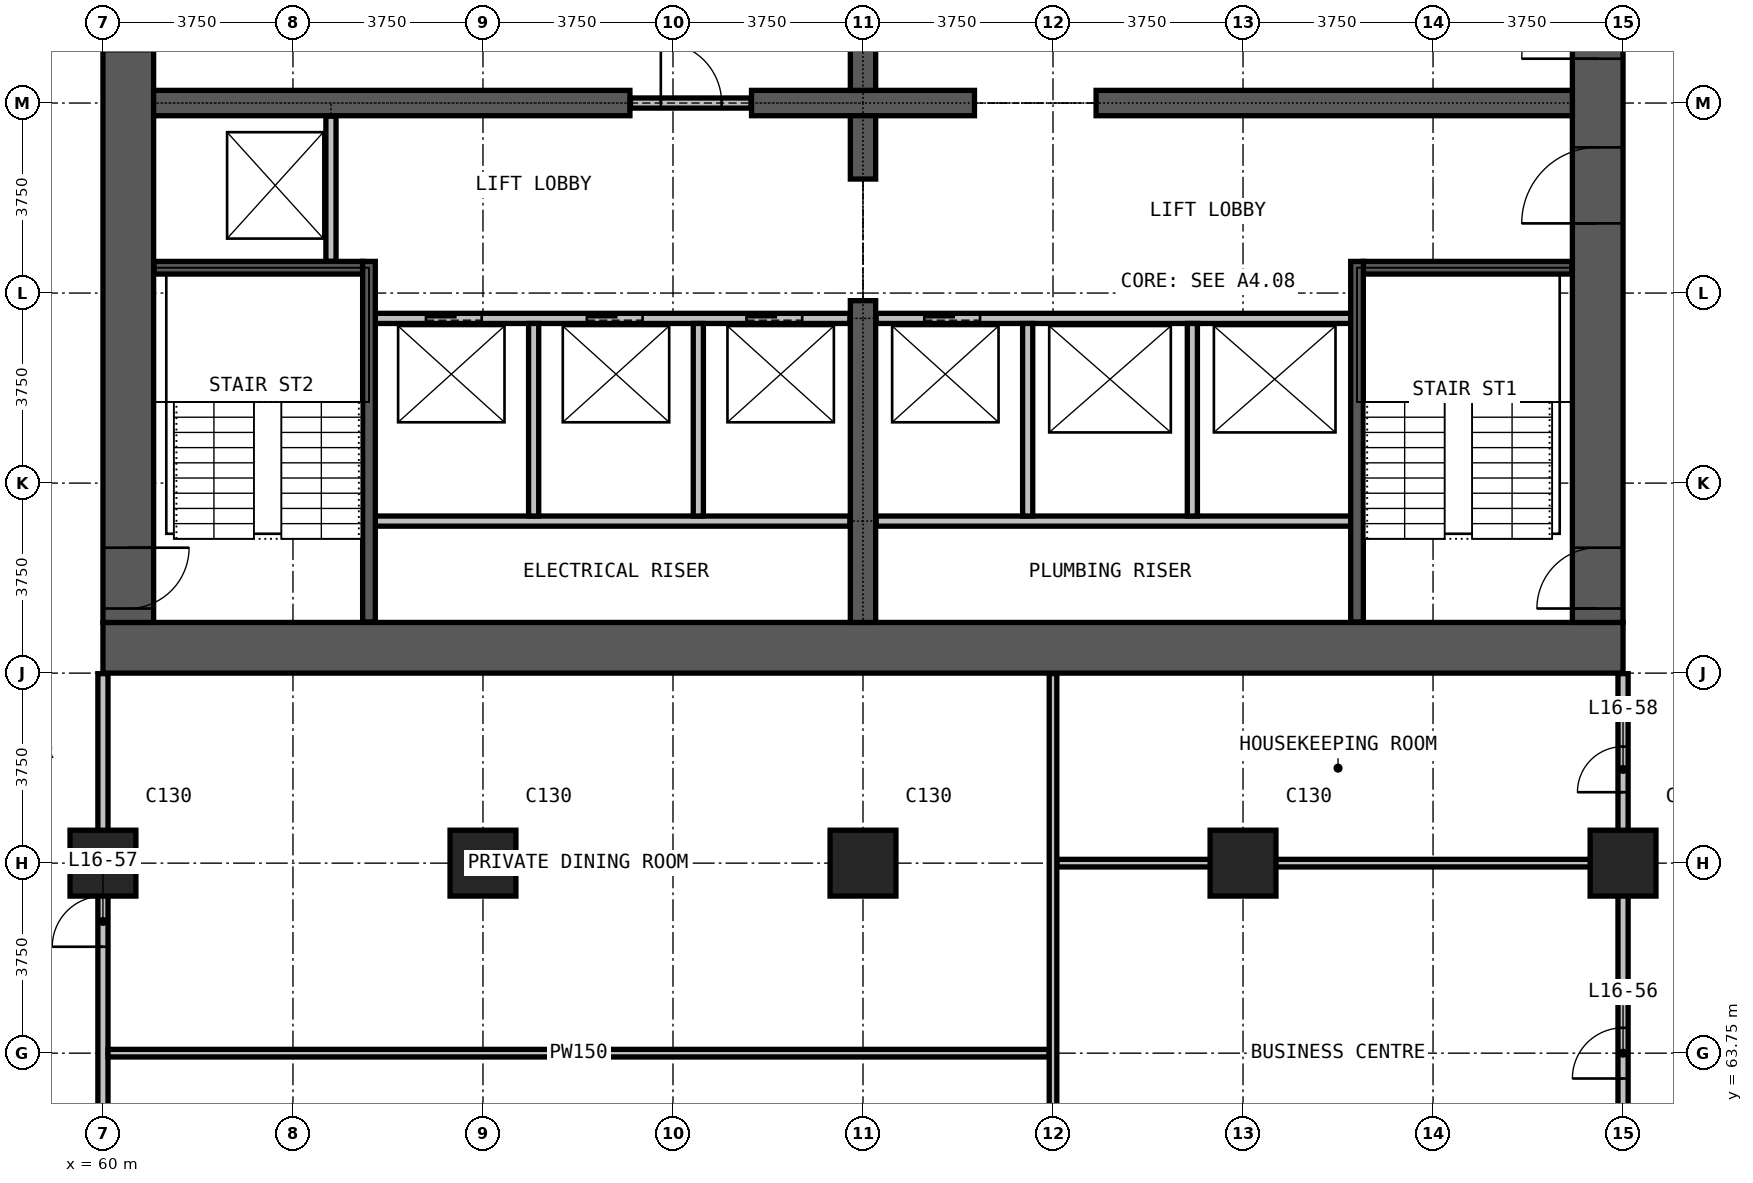
"""IFC4 building model, lengths in metres.
Left out: names, types, materials, properties, quantities, classifications, styles, units other than length and angle.
Written with IfcOpenShell. Run it as: python <this file> out.ifc"""

import sys

from ifc_helpers import new_model, si_unit, direction, frame, frame_2d, origin, origin_2d, place, context, subcontext, project, spatial, rectangle, extrude, element, fill, save


model = new_model("IFC4")
c1 = context("Model", 3, precision=1e-05, world=origin(), true_north=direction((0.0, 1.0)))
c2 = subcontext(c1, "Body", "Model", "MODEL_VIEW")
j1 = project(units=[si_unit("LENGTHUNIT", "METRE"), si_unit("PLANEANGLEUNIT", "RADIAN")], contexts=[c1])
p1 = place(None, origin())
s1 = spatial("IfcSite", under=j1, at=p1, CompositionType="ELEMENT")
p2 = place(p1, origin())
s2 = spatial("IfcBuilding", under=s1, at=p2, CompositionType="ELEMENT")
p3 = place(p2, frame((0.0, 0.0, 72.5)))
s3 = spatial("IfcBuildingStorey", under=s2, at=p3, CompositionType="ELEMENT", Elevation=72.5)
for number, where, z_axis, x_axis in (
    (1, (60.0, 67.5, 0.0), (0.0, 0.0, 1.0), (1.0, 0.0, 0.0)),
    (2, (67.5, 67.5, 0.0), (0.0, 0.0, 1.0), (1.0, 0.0, 0.0)),
    (3, (75.0, 67.5, 0.0), (0.0, 0.0, 1.0), (1.0, 0.0, 0.0)),
    (4, (82.5, 67.5, 0.0), (0.0, 0.0, 1.0), (1.0, 0.0, 0.0)),
    (5, (90.0, 67.5, 0.0), (0.0, 0.0, 1.0), (1.0, 0.0, 0.0)),
):
    element("IfcColumn", number, at=place(p3, frame(where, z_axis=z_axis, x_axis=x_axis)), inside=s3, PredefinedType="COLUMN", context=c2, shape_type="SweptSolid", body=[
        extrude(rectangle(XDim=1.3, YDim=1.3, at=origin_2d()), origin(), (0.0, 0.0, 1.0), 3.3),
    ])
p4 = place(p3, frame((60.0, 71.75, 0.0), z_axis=(0.0, 0.0, 1.0), x_axis=(1.0, 0.0, 0.0)))
e6 = element("IfcWall", 6, at=p4, inside=s3, PredefinedType="SHEAR", context=c2, shape_type="SweptSolid", body=[
    extrude(rectangle(XDim=30.0, YDim=1.0, at=frame_2d((15.0, 0.0))), origin(), (0.0, 0.0, 1.0), 3.3),
])
p5 = place(p3, frame((89.5, 72.25, 0.0), z_axis=(0.0, 0.0, 1.0), x_axis=(0.0, 1.0, 0.0)))
e7 = element("IfcWall", 7, at=p5, inside=s3, PredefinedType="SHEAR", context=c2, shape_type="SweptSolid", body=[
    extrude(rectangle(XDim=20.5, YDim=1.0, at=frame_2d((10.25, 0.0))), origin(), (0.0, 0.0, 1.0), 3.3),
])
p6 = place(p5, frame((0.275, 0.0, 0.0)))
e8 = element("IfcOpeningElement", 8, at=p6, cuts=e7, PredefinedType="OPENING", context=c2, shape_type="SweptSolid", body=[
    extrude(rectangle(XDim=1.2, YDim=2.2, at=frame_2d((0.6, 1.1))), frame((0.0, 0.51, 0.0), z_axis=(0.0, -1.0, 0.0), x_axis=(1.0, 0.0, 0.0)), (0.0, 0.0, 1.0), 1.02),
])
p7 = place(p5, frame((13.775, 0.0, 0.0)))
e9 = element("IfcOpeningElement", 9, at=p7, cuts=e7, PredefinedType="OPENING", context=c2, shape_type="SweptSolid", body=[
    extrude(rectangle(XDim=1.2, YDim=2.2, at=frame_2d((0.6, 1.1))), frame((0.0, 0.51, 0.0), z_axis=(0.0, -1.0, 0.0), x_axis=(1.0, 0.0, 0.0)), (0.0, 0.0, 1.0), 1.02),
])
p8 = place(p5, frame((7.875, 0.0, 0.0)))
e10 = element("IfcOpeningElement", 10, at=p8, cuts=e7, PredefinedType="OPENING", context=c2, shape_type="SweptSolid", body=[
    extrude(rectangle(XDim=1.5, YDim=2.2, at=frame_2d((0.75, 1.1))), frame((0.0, 0.51, 0.0), z_axis=(0.0, -1.0, 0.0), x_axis=(1.0, 0.0, 0.0)), (0.0, 0.0, 1.0), 1.02),
])
p9 = place(p5, frame((11.125, 0.0, 0.0)))
e11 = element("IfcOpeningElement", 11, at=p9, cuts=e7, PredefinedType="OPENING", context=c2, shape_type="SweptSolid", body=[
    extrude(rectangle(XDim=1.5, YDim=2.2, at=frame_2d((0.75, 1.1))), frame((0.0, 0.51, 0.0), z_axis=(0.0, -1.0, 0.0), x_axis=(1.0, 0.0, 0.0)), (0.0, 0.0, 1.0), 1.02),
])
p10 = place(p3, frame((60.5, 92.75, 0.0), z_axis=(0.0, 0.0, 1.0), x_axis=(0.0, -1.0, 0.0)))
e12 = element("IfcWall", 12, at=p10, inside=s3, PredefinedType="SHEAR", context=c2, shape_type="SweptSolid", body=[
    extrude(rectangle(XDim=20.5, YDim=1.0, at=frame_2d((10.25, 0.0))), origin(), (0.0, 0.0, 1.0), 3.3),
])
p11 = place(p10, frame((19.025, 0.0, 0.0)))
e13 = element("IfcOpeningElement", 13, at=p11, cuts=e12, PredefinedType="OPENING", context=c2, shape_type="SweptSolid", body=[
    extrude(rectangle(XDim=1.2, YDim=2.2, at=frame_2d((0.6, 1.1))), frame((0.0, 0.51, 0.0), z_axis=(0.0, -1.0, 0.0), x_axis=(1.0, 0.0, 0.0)), (0.0, 0.0, 1.0), 1.02),
])
p12 = place(p10, frame((8.025, 0.0, 0.0)))
e14 = element("IfcOpeningElement", 14, at=p12, cuts=e12, PredefinedType="OPENING", context=c2, shape_type="SweptSolid", body=[
    extrude(rectangle(XDim=1.2, YDim=2.2, at=frame_2d((0.6, 1.1))), frame((0.0, 0.51, 0.0), z_axis=(0.0, -1.0, 0.0), x_axis=(1.0, 0.0, 0.0)), (0.0, 0.0, 1.0), 1.02),
])
p13 = place(p3, frame((61.0, 82.5, 0.0), z_axis=(0.0, 0.0, 1.0), x_axis=(1.0, 0.0, 0.0)))
e15 = element("IfcWall", 15, at=p13, inside=s3, PredefinedType="SHEAR", context=c2, shape_type="SweptSolid", body=[
    extrude(rectangle(XDim=9.4, YDim=0.5, at=frame_2d((4.7, 0.0))), origin(), (0.0, 0.0, 1.0), 3.3),
])
p14 = place(p3, frame((72.8, 82.5, 0.0), z_axis=(0.0, 0.0, 1.0), x_axis=(1.0, 0.0, 0.0)))
e16 = element("IfcWall", 16, at=p14, inside=s3, PredefinedType="SHEAR", context=c2, shape_type="SweptSolid", body=[
    extrude(rectangle(XDim=4.4, YDim=0.5, at=frame_2d((2.2, 0.0))), origin(), (0.0, 0.0, 1.0), 3.3),
])
p15 = place(p3, frame((79.6, 82.5, 0.0), z_axis=(0.0, 0.0, 1.0), x_axis=(1.0, 0.0, 0.0)))
e17 = element("IfcWall", 17, at=p15, inside=s3, PredefinedType="SHEAR", context=c2, shape_type="SweptSolid", body=[
    extrude(rectangle(XDim=9.4, YDim=0.5, at=frame_2d((4.7, 0.0))), origin(), (0.0, 0.0, 1.0), 3.3),
])
p16 = place(p3, frame((75.0, 72.25, 0.0), z_axis=(0.0, 0.0, 1.0), x_axis=(0.0, 1.0, 0.0)))
e18 = element("IfcWall", 18, at=p16, inside=s3, PredefinedType="SHEAR", context=c2, shape_type="SweptSolid", body=[
    extrude(rectangle(XDim=6.35, YDim=0.5, at=frame_2d((3.175, 0.0))), origin(), (0.0, 0.0, 1.0), 3.3),
])
for number, where, z_axis, x_axis in (
    (19, (75.0, 81.0, 0.0), (0.0, 0.0, 1.0), (0.0, 1.0, 0.0)),
    (20, (75.0, 82.75, 0.0), (0.0, 0.0, 1.0), (0.0, 1.0, 0.0)),
):
    element("IfcWall", number, at=place(p3, frame(where, z_axis=z_axis, x_axis=x_axis)), inside=s3, PredefinedType="SHEAR", context=c2, shape_type="SweptSolid", body=[
        extrude(rectangle(XDim=1.25, YDim=0.5, at=frame_2d((0.625, 0.0))), origin(), (0.0, 0.0, 1.0), 3.3),
    ])
p17 = place(p3, frame((70.41, 82.5, 0.0), z_axis=(0.0, 0.0, 1.0), x_axis=(1.0, 0.0, 0.0)))
e21 = element("IfcWall", 21, at=p17, inside=s3, PredefinedType="PARTITIONING", context=c2, shape_type="SweptSolid", body=[
    extrude(rectangle(XDim=2.38, YDim=0.2, at=frame_2d((1.19, 0.0))), origin(), (0.0, 0.0, 1.0), 2.4),
])
p18 = place(p17, frame((0.6, 0.0, 0.0)))
e22 = element("IfcOpeningElement", 22, at=p18, cuts=e21, PredefinedType="OPENING", context=c2, shape_type="SweptSolid", body=[
    extrude(rectangle(XDim=1.2, YDim=2.2, at=frame_2d((0.6, 1.1))), frame((0.0, 0.11, 0.0), z_axis=(0.0, -1.0, 0.0), x_axis=(1.0, 0.0, 0.0)), (0.0, 0.0, 1.0), 0.22),
])
p19 = place(p3, frame((60.0, 52.4, 0.0), z_axis=(0.0, 0.0, 1.0), x_axis=(0.0, 1.0, 0.0)))
e23 = element("IfcWall", 23, at=p19, inside=s3, PredefinedType="PARTITIONING", context=c2, shape_type="SweptSolid", body=[
    extrude(rectangle(XDim=18.84, YDim=0.2, at=frame_2d((9.42, 0.0))), origin(), (0.0, 0.0, 1.0), 3.0),
])
p20 = place(p19, frame((13.45, 0.0, 0.0)))
e24 = element("IfcOpeningElement", 24, at=p20, cuts=e23, PredefinedType="OPENING", context=c2, shape_type="SweptSolid", body=[
    extrude(rectangle(XDim=1.0, YDim=2.2, at=frame_2d((0.5, 1.1))), frame((0.0, 0.11, 0.0), z_axis=(0.0, -1.0, 0.0), x_axis=(1.0, 0.0, 0.0)), (0.0, 0.0, 1.0), 0.22),
])
p21 = place(p3, frame((90.0, 52.4, 0.0), z_axis=(0.0, 0.0, 1.0), x_axis=(0.0, 1.0, 0.0)))
e25 = element("IfcWall", 25, at=p21, inside=s3, PredefinedType="PARTITIONING", context=c2, shape_type="SweptSolid", body=[
    extrude(rectangle(XDim=18.84, YDim=0.2, at=frame_2d((9.42, 0.0))), origin(), (0.0, 0.0, 1.0), 3.0),
])
p22 = place(p21, frame((10.85, 0.0, 0.0)))
e26 = element("IfcOpeningElement", 26, at=p22, cuts=e25, PredefinedType="OPENING", context=c2, shape_type="SweptSolid", body=[
    extrude(rectangle(XDim=1.0, YDim=2.2, at=frame_2d((0.5, 1.1))), frame((0.0, 0.11, 0.0), z_axis=(0.0, -1.0, 0.0), x_axis=(1.0, 0.0, 0.0)), (0.0, 0.0, 1.0), 0.22),
])
p23 = place(p21, frame((16.5, 0.0, 0.0)))
e27 = element("IfcOpeningElement", 27, at=p23, cuts=e25, PredefinedType="OPENING", context=c2, shape_type="SweptSolid", body=[
    extrude(rectangle(XDim=0.9, YDim=2.2, at=frame_2d((0.45, 1.1))), frame((0.0, 0.11, 0.0), z_axis=(0.0, -1.0, 0.0), x_axis=(1.0, 0.0, 0.0)), (0.0, 0.0, 1.0), 0.22),
])
p24 = place(p3, frame((60.1, 63.75, 0.0), z_axis=(0.0, 0.0, 1.0), x_axis=(1.0, 0.0, 0.0)))
e28 = element("IfcWall", 28, at=p24, inside=s3, PredefinedType="PARTITIONING", context=c2, shape_type="SweptSolid", body=[
    extrude(rectangle(XDim=18.575, YDim=0.15, at=frame_2d((9.288, 0.0))), origin(), (0.0, 0.0, 1.0), 3.0),
])
p25 = place(p3, frame((78.825, 67.5, 0.0), z_axis=(0.0, 0.0, 1.0), x_axis=(1.0, 0.0, 0.0)))
e29 = element("IfcWall", 29, at=p25, inside=s3, PredefinedType="PARTITIONING", context=c2, shape_type="SweptSolid", body=[
    extrude(rectangle(XDim=11.075, YDim=0.15, at=frame_2d((5.538, 0.0))), origin(), (0.0, 0.0, 1.0), 3.0),
])
p26 = place(p3, frame((78.75, 52.6, 0.0), z_axis=(0.0, 0.0, 1.0), x_axis=(0.0, 1.0, 0.0)))
e30 = element("IfcWall", 30, at=p26, inside=s3, PredefinedType="PARTITIONING", context=c2, shape_type="SweptSolid", body=[
    extrude(rectangle(XDim=18.64, YDim=0.15, at=frame_2d((9.32, 0.0))), origin(), (0.0, 0.0, 1.0), 3.0),
])
for number, where, z_axis, x_axis in (
    (31, (65.375, 74.25, 0.0), (0.0, 0.0, 1.0), (1.0, 0.0, 0.0)),
    (32, (75.26, 74.25, 0.0), (0.0, 0.0, 1.0), (1.0, 0.0, 0.0)),
):
    element("IfcWall", number, at=place(p3, frame(where, z_axis=z_axis, x_axis=x_axis)), inside=s3, PredefinedType="PARTITIONING", context=c2, shape_type="SweptSolid", body=[
        extrude(rectangle(XDim=9.365, YDim=0.2, at=frame_2d((4.683, 0.0))), origin(), (0.0, 0.0, 1.0), 3.0),
    ])
p27 = place(p3, frame((65.375, 78.25, 0.0), z_axis=(0.0, 0.0, 1.0), x_axis=(1.0, 0.0, 0.0)))
e33 = element("IfcWall", 33, at=p27, inside=s3, PredefinedType="PARTITIONING", context=c2, shape_type="SweptSolid", body=[
    extrude(rectangle(XDim=9.365, YDim=0.2, at=frame_2d((4.683, 0.0))), origin(), (0.0, 0.0, 1.0), 3.0),
])
p28 = place(p27, frame((1.0, 0.0, 0.0)))
e34 = element("IfcOpeningElement", 34, at=p28, cuts=e33, PredefinedType="OPENING", context=c2, shape_type="SweptSolid", body=[
    extrude(rectangle(XDim=1.1, YDim=2.2, at=frame_2d((0.55, 1.1))), frame((0.0, 0.11, 0.0), z_axis=(0.0, -1.0, 0.0), x_axis=(1.0, 0.0, 0.0)), (0.0, 0.0, 1.0), 0.22),
])
p29 = place(p27, frame((4.175, 0.0, 0.0)))
e35 = element("IfcOpeningElement", 35, at=p29, cuts=e33, PredefinedType="OPENING", context=c2, shape_type="SweptSolid", body=[
    extrude(rectangle(XDim=1.1, YDim=2.2, at=frame_2d((0.55, 1.1))), frame((0.0, 0.11, 0.0), z_axis=(0.0, -1.0, 0.0), x_axis=(1.0, 0.0, 0.0)), (0.0, 0.0, 1.0), 0.22),
])
p30 = place(p27, frame((7.325, 0.0, 0.0)))
e36 = element("IfcOpeningElement", 36, at=p30, cuts=e33, PredefinedType="OPENING", context=c2, shape_type="SweptSolid", body=[
    extrude(rectangle(XDim=1.1, YDim=2.2, at=frame_2d((0.55, 1.1))), frame((0.0, 0.11, 0.0), z_axis=(0.0, -1.0, 0.0), x_axis=(1.0, 0.0, 0.0)), (0.0, 0.0, 1.0), 0.22),
])
p31 = place(p3, frame((75.26, 78.25, 0.0), z_axis=(0.0, 0.0, 1.0), x_axis=(1.0, 0.0, 0.0)))
e37 = element("IfcWall", 37, at=p31, inside=s3, PredefinedType="PARTITIONING", context=c2, shape_type="SweptSolid", body=[
    extrude(rectangle(XDim=9.365, YDim=0.2, at=frame_2d((4.683, 0.0))), origin(), (0.0, 0.0, 1.0), 3.0),
])
p32 = place(p31, frame((0.95, 0.0, 0.0)))
e38 = element("IfcOpeningElement", 38, at=p32, cuts=e37, PredefinedType="OPENING", context=c2, shape_type="SweptSolid", body=[
    extrude(rectangle(XDim=1.1, YDim=2.2, at=frame_2d((0.55, 1.1))), frame((0.0, 0.11, 0.0), z_axis=(0.0, -1.0, 0.0), x_axis=(1.0, 0.0, 0.0)), (0.0, 0.0, 1.0), 0.22),
])
p33 = place(p3, frame((64.5, 79.375, 0.0), z_axis=(0.0, 0.0, 1.0), x_axis=(0.0, 1.0, 0.0)))
e39 = element("IfcWall", 39, at=p33, inside=s3, PredefinedType="PARTITIONING", context=c2, shape_type="SweptSolid", body=[
    extrude(rectangle(XDim=2.865, YDim=0.2, at=frame_2d((1.433, 0.0))), origin(), (0.0, 0.0, 1.0), 3.0),
])
for number, where, z_axis, x_axis in (
    (40, (68.5, 74.35, 0.0), (0.0, 0.0, 1.0), (0.0, 1.0, 0.0)),
    (41, (71.75, 74.35, 0.0), (0.0, 0.0, 1.0), (0.0, 1.0, 0.0)),
    (42, (78.25, 74.35, 0.0), (0.0, 0.0, 1.0), (0.0, 1.0, 0.0)),
    (43, (81.5, 74.35, 0.0), (0.0, 0.0, 1.0), (0.0, 1.0, 0.0)),
):
    element("IfcWall", number, at=place(p3, frame(where, z_axis=z_axis, x_axis=x_axis)), inside=s3, PredefinedType="PARTITIONING", context=c2, shape_type="SweptSolid", body=[
        extrude(rectangle(XDim=3.8, YDim=0.2, at=frame_2d((1.9, 0.0))), origin(), (0.0, 0.0, 1.0), 3.0),
    ])
for number, where, z_axis, x_axis in (
    (44, (61.01, 79.25, 0.0), (0.0, 0.0, 1.0), (1.0, 0.0, 0.0)),
    (45, (84.875, 79.25, 0.0), (0.0, 0.0, 1.0), (1.0, 0.0, 0.0)),
):
    element("IfcWall", number, at=place(p3, frame(where, z_axis=z_axis, x_axis=x_axis)), inside=s3, PredefinedType="PARTITIONING", context=c2, shape_type="SweptSolid", body=[
        extrude(rectangle(XDim=4.115, YDim=0.25, at=frame_2d((2.058, 0.0))), origin(), (0.0, 0.0, 1.0), 3.0),
    ])
for number, where, z_axis, x_axis in (
    (46, (65.25, 72.26, 0.0), (0.0, 0.0, 1.0), (0.0, 1.0, 0.0)),
    (47, (84.75, 72.26, 0.0), (0.0, 0.0, 1.0), (0.0, 1.0, 0.0)),
):
    element("IfcWall", number, at=place(p3, frame(where, z_axis=z_axis, x_axis=x_axis)), inside=s3, PredefinedType="PARTITIONING", context=c2, shape_type="SweptSolid", body=[
        extrude(rectangle(XDim=7.115, YDim=0.25, at=frame_2d((3.558, 0.0))), origin(), (0.0, 0.0, 1.0), 3.0),
    ])
p34 = place(p28, origin())
e48 = element("IfcDoor", 48, at=p34, inside=s3, OperationType="DOUBLE_DOOR_SLIDING", PredefinedType="DOOR", context=c2, shape_type="SweptSolid", body=[
    extrude(rectangle(XDim=1.1, YDim=2.2, at=frame_2d((0.55, 1.1))), frame((0.0, 0.025, 0.0), z_axis=(0.0, -1.0, 0.0), x_axis=(1.0, 0.0, 0.0)), (0.0, 0.0, 1.0), 0.05),
])
fill(e34, e48)
p35 = place(p29, origin())
e49 = element("IfcDoor", 49, at=p35, inside=s3, OperationType="DOUBLE_DOOR_SLIDING", PredefinedType="DOOR", context=c2, shape_type="SweptSolid", body=[
    extrude(rectangle(XDim=1.1, YDim=2.2, at=frame_2d((0.55, 1.1))), frame((0.0, 0.025, 0.0), z_axis=(0.0, -1.0, 0.0), x_axis=(1.0, 0.0, 0.0)), (0.0, 0.0, 1.0), 0.05),
])
fill(e35, e49)
p36 = place(p30, origin())
e50 = element("IfcDoor", 50, at=p36, inside=s3, OperationType="DOUBLE_DOOR_SLIDING", PredefinedType="DOOR", context=c2, shape_type="SweptSolid", body=[
    extrude(rectangle(XDim=1.1, YDim=2.2, at=frame_2d((0.55, 1.1))), frame((0.0, 0.025, 0.0), z_axis=(0.0, -1.0, 0.0), x_axis=(1.0, 0.0, 0.0)), (0.0, 0.0, 1.0), 0.05),
])
fill(e36, e50)
p37 = place(p32, origin())
e51 = element("IfcDoor", 51, at=p37, inside=s3, OperationType="DOUBLE_DOOR_SLIDING", PredefinedType="DOOR", context=c2, shape_type="SweptSolid", body=[
    extrude(rectangle(XDim=1.1, YDim=2.2, at=frame_2d((0.55, 1.1))), frame((0.0, 0.025, 0.0), z_axis=(0.0, -1.0, 0.0), x_axis=(1.0, 0.0, 0.0)), (0.0, 0.0, 1.0), 0.05),
])
fill(e38, e51)
p38 = place(p18, origin())
e52 = element("IfcDoor", 52, at=p38, inside=s3, OperationType="SINGLE_SWING_LEFT", PredefinedType="DOOR", context=c2, shape_type="SweptSolid", body=[
    extrude(rectangle(XDim=1.2, YDim=2.2, at=frame_2d((0.6, 1.1))), frame((0.0, 0.025, 0.0), z_axis=(0.0, -1.0, 0.0), x_axis=(1.0, 0.0, 0.0)), (0.0, 0.0, 1.0), 0.05),
])
fill(e22, e52)
p39 = place(p6, origin())
e53 = element("IfcDoor", 53, at=p39, inside=s3, OperationType="SINGLE_SWING_RIGHT", PredefinedType="DOOR", context=c2, shape_type="SweptSolid", body=[
    extrude(rectangle(XDim=1.2, YDim=2.2, at=frame_2d((0.6, 1.1))), frame((0.0, 0.025, 0.0), z_axis=(0.0, -1.0, 0.0), x_axis=(1.0, 0.0, 0.0)), (0.0, 0.0, 1.0), 0.05),
])
fill(e8, e53)
p40 = place(p11, origin())
e54 = element("IfcDoor", 54, at=p40, inside=s3, OperationType="SINGLE_SWING_RIGHT", PredefinedType="DOOR", context=c2, shape_type="SweptSolid", body=[
    extrude(rectangle(XDim=1.2, YDim=2.2, at=frame_2d((0.6, 1.1))), frame((0.0, 0.025, 0.0), z_axis=(0.0, -1.0, 0.0), x_axis=(1.0, 0.0, 0.0)), (0.0, 0.0, 1.0), 0.05),
])
fill(e13, e54)
p41 = place(p8, origin())
e55 = element("IfcDoor", 55, at=p41, inside=s3, OperationType="DOUBLE_DOOR_SINGLE_SWING", PredefinedType="DOOR", context=c2, shape_type="SweptSolid", body=[
    extrude(rectangle(XDim=1.5, YDim=2.2, at=frame_2d((0.75, 1.1))), frame((0.0, 0.025, 0.0), z_axis=(0.0, -1.0, 0.0), x_axis=(1.0, 0.0, 0.0)), (0.0, 0.0, 1.0), 0.05),
])
fill(e10, e55)
p42 = place(p9, origin())
e56 = element("IfcDoor", 56, at=p42, inside=s3, OperationType="DOUBLE_DOOR_SINGLE_SWING", PredefinedType="DOOR", context=c2, shape_type="SweptSolid", body=[
    extrude(rectangle(XDim=1.5, YDim=2.2, at=frame_2d((0.75, 1.1))), frame((0.0, 0.025, 0.0), z_axis=(0.0, -1.0, 0.0), x_axis=(1.0, 0.0, 0.0)), (0.0, 0.0, 1.0), 0.05),
])
fill(e11, e56)
p43 = place(p22, origin())
e57 = element("IfcDoor", 57, at=p43, inside=s3, OperationType="SINGLE_SWING_RIGHT", PredefinedType="DOOR", context=c2, shape_type="SweptSolid", body=[
    extrude(rectangle(XDim=1.0, YDim=2.2, at=frame_2d((0.5, 1.1))), frame((0.0, 0.025, 0.0), z_axis=(0.0, -1.0, 0.0), x_axis=(1.0, 0.0, 0.0)), (0.0, 0.0, 1.0), 0.05),
])
fill(e26, e57)
p44 = place(p20, origin())
e58 = element("IfcDoor", 58, at=p44, inside=s3, OperationType="SINGLE_SWING_RIGHT", PredefinedType="DOOR", context=c2, shape_type="SweptSolid", body=[
    extrude(rectangle(XDim=1.0, YDim=2.2, at=frame_2d((0.5, 1.1))), frame((0.0, 0.025, 0.0), z_axis=(0.0, -1.0, 0.0), x_axis=(1.0, 0.0, 0.0)), (0.0, 0.0, 1.0), 0.05),
])
fill(e24, e58)
p45 = place(p23, origin())
e59 = element("IfcDoor", 59, at=p45, inside=s3, OperationType="SINGLE_SWING_LEFT", PredefinedType="DOOR", context=c2, shape_type="SweptSolid", body=[
    extrude(rectangle(XDim=0.9, YDim=2.2, at=frame_2d((0.45, 1.1))), frame((0.0, 0.025, 0.0), z_axis=(0.0, -1.0, 0.0), x_axis=(1.0, 0.0, 0.0)), (0.0, 0.0, 1.0), 0.05),
])
fill(e27, e59)
save(model, sys.argv[1])
